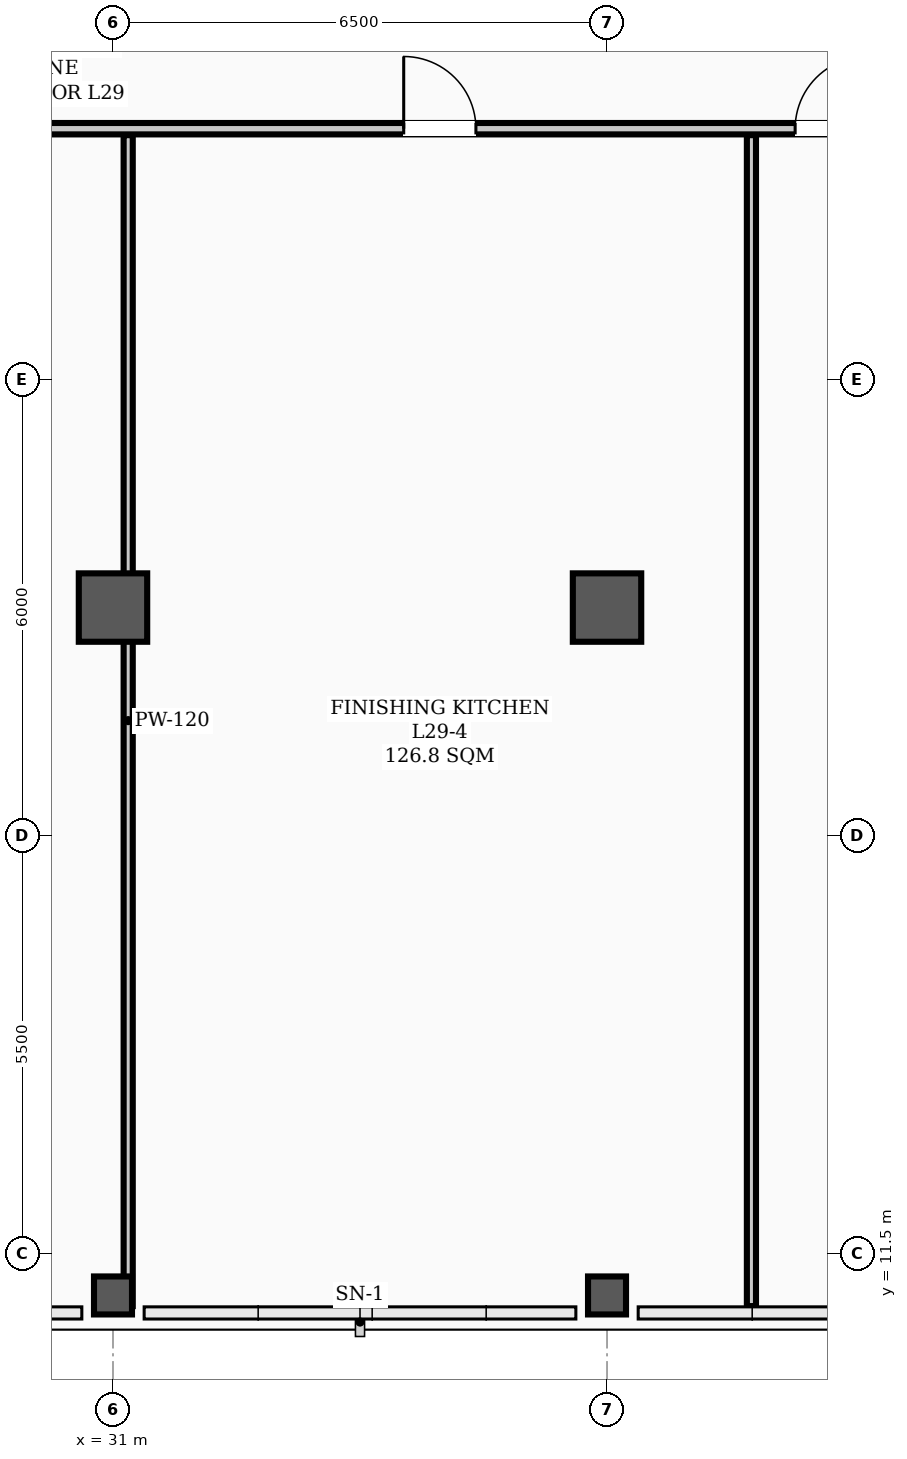
"""IFC4 building model, lengths in metres.
Left out: names, types, materials, properties, quantities, classifications, styles, units other than length and angle.
Written with IfcOpenShell. Run it as: python <this file> out.ifc"""

import sys

from ifc_helpers import new_model, si_unit, direction, frame, frame_2d, origin, origin_2d, place, context, subcontext, project, spatial, rectangle, hollow_rectangle, extrude, element, fill, save


model = new_model("IFC4")
c1 = context("Model", 3, precision=1e-05, world=origin(), true_north=direction((0.0, 1.0)))
c2 = subcontext(c1, "Body", "Model", "MODEL_VIEW")
j1 = project(units=[si_unit("LENGTHUNIT", "METRE"), si_unit("PLANEANGLEUNIT", "RADIAN")], contexts=[c1])
p1 = place(None, origin())
s1 = spatial("IfcSite", under=j1, at=p1, CompositionType="ELEMENT")
p2 = place(p1, origin())
s2 = spatial("IfcBuilding", under=s1, at=p2, CompositionType="ELEMENT")
p3 = place(p2, frame((0.0, 0.0, 118.8)))
s3 = spatial("IfcBuildingStorey", under=s2, at=p3, CompositionType="ELEMENT", Elevation=118.8)
for number, where, z_axis, x_axis in (
    (1, (31.0, 20.0, 0.0), (0.0, 0.0, 1.0), (1.0, 0.0, 0.0)),
    (2, (37.5, 20.0, 0.0), (0.0, 0.0, 1.0), (1.0, 0.0, 0.0)),
):
    element("IfcColumn", number, at=place(p3, frame(where, z_axis=z_axis, x_axis=x_axis)), inside=s3, PredefinedType="COLUMN", context=c2, shape_type="SweptSolid", body=[
        extrude(hollow_rectangle(XDim=0.9, YDim=0.9, WallThickness=0.035, InnerFilletRadius=0.017, OuterFilletRadius=0.052, at=origin_2d()), origin(), (0.0, 0.0, 1.0), 3.9),
    ])
for number, where, z_axis, x_axis in (
    (3, (31.0, 10.95, 0.0), (0.0, 0.0, 1.0), (1.0, 0.0, 0.0)),
    (4, (37.5, 10.95, 0.0), (0.0, 0.0, 1.0), (1.0, 0.0, 0.0)),
):
    element("IfcColumn", number, at=place(p3, frame(where, z_axis=z_axis, x_axis=x_axis)), inside=s3, PredefinedType="COLUMN", context=c2, shape_type="SweptSolid", body=[
        extrude(hollow_rectangle(XDim=0.5, YDim=0.5, WallThickness=0.024, InnerFilletRadius=0.012, OuterFilletRadius=0.036, at=origin_2d()), origin(), (0.0, 0.0, 1.0), 3.9),
    ])
p4 = place(p3, frame((2.31, 26.3, 0.0), z_axis=(0.0, 0.0, 1.0), x_axis=(1.0, 0.0, 0.0)))
e5 = element("IfcWall", 5, at=p4, inside=s3, PredefinedType="PARTITIONING", context=c2, shape_type="SweptSolid", body=[
    extrude(rectangle(XDim=46.38, YDim=0.15, at=frame_2d((23.19, 0.0))), origin(), (0.0, 0.0, 1.0), 3.1),
])
p5 = place(p4, frame((10.19, 0.0, 0.0)))
e6 = element("IfcOpeningElement", 6, at=p5, cuts=e5, PredefinedType="OPENING", context=c2, shape_type="SweptSolid", body=[
    extrude(rectangle(XDim=0.95, YDim=2.08, at=frame_2d((0.475, 1.04))), frame((0.0, 0.085, 0.0), z_axis=(0.0, -1.0, 0.0), x_axis=(1.0, 0.0, 0.0)), (0.0, 0.0, 1.0), 0.17),
])
p6 = place(p4, frame((15.915, 0.0, 0.0)))
e7 = element("IfcOpeningElement", 7, at=p6, cuts=e5, PredefinedType="OPENING", context=c2, shape_type="SweptSolid", body=[
    extrude(rectangle(XDim=0.95, YDim=2.08, at=frame_2d((0.475, 1.04))), frame((0.0, 0.085, 0.0), z_axis=(0.0, -1.0, 0.0), x_axis=(1.0, 0.0, 0.0)), (0.0, 0.0, 1.0), 0.17),
])
p7 = place(p4, frame((24.115, 0.0, 0.0)))
e8 = element("IfcOpeningElement", 8, at=p7, cuts=e5, PredefinedType="OPENING", context=c2, shape_type="SweptSolid", body=[
    extrude(rectangle(XDim=0.95, YDim=2.08, at=frame_2d((0.475, 1.04))), frame((0.0, 0.085, 0.0), z_axis=(0.0, -1.0, 0.0), x_axis=(1.0, 0.0, 0.0)), (0.0, 0.0, 1.0), 0.17),
])
p8 = place(p4, frame((32.515, 0.0, 0.0)))
e9 = element("IfcOpeningElement", 9, at=p8, cuts=e5, PredefinedType="OPENING", context=c2, shape_type="SweptSolid", body=[
    extrude(rectangle(XDim=0.95, YDim=2.08, at=frame_2d((0.475, 1.04))), frame((0.0, 0.085, 0.0), z_axis=(0.0, -1.0, 0.0), x_axis=(1.0, 0.0, 0.0)), (0.0, 0.0, 1.0), 0.17),
])
p9 = place(p4, frame((37.665, 0.0, 0.0)))
e10 = element("IfcOpeningElement", 10, at=p9, cuts=e5, PredefinedType="OPENING", context=c2, shape_type="SweptSolid", body=[
    extrude(rectangle(XDim=0.95, YDim=2.08, at=frame_2d((0.475, 1.04))), frame((0.0, 0.085, 0.0), z_axis=(0.0, -1.0, 0.0), x_axis=(1.0, 0.0, 0.0)), (0.0, 0.0, 1.0), 0.17),
])
for number, where, z_axis, x_axis in (
    (11, (31.2, 10.81, 0.0), (0.0, 0.0, 1.0), (0.0, 1.0, 0.0)),
    (12, (39.4, 10.81, 0.0), (0.0, 0.0, 1.0), (0.0, 1.0, 0.0)),
):
    element("IfcWall", number, at=place(p3, frame(where, z_axis=z_axis, x_axis=x_axis)), inside=s3, PredefinedType="PARTITIONING", context=c2, shape_type="SweptSolid", body=[
        extrude(rectangle(XDim=15.405, YDim=0.12, at=frame_2d((7.703, 0.0))), origin(), (0.0, 0.0, 1.0), 3.0),
    ])
p10 = place(p8, origin())
e13 = element("IfcDoor", 13, at=p10, inside=s3, OperationType="SINGLE_SWING_LEFT", PredefinedType="DOOR", context=c2, shape_type="SweptSolid", body=[
    extrude(rectangle(XDim=0.95, YDim=2.08, at=frame_2d((0.475, 1.04))), frame((0.0, 0.025, 0.0), z_axis=(0.0, -1.0, 0.0), x_axis=(1.0, 0.0, 0.0)), (0.0, 0.0, 1.0), 0.05),
])
fill(e9, e13)
p11 = place(p9, origin())
e14 = element("IfcDoor", 14, at=p11, inside=s3, OperationType="SINGLE_SWING_RIGHT", PredefinedType="DOOR", context=c2, shape_type="SweptSolid", body=[
    extrude(rectangle(XDim=0.95, YDim=2.08, at=frame_2d((0.475, 1.04))), frame((0.0, 0.025, 0.0), z_axis=(0.0, -1.0, 0.0), x_axis=(1.0, 0.0, 0.0)), (0.0, 0.0, 1.0), 0.05),
])
fill(e10, e14)
save(model, sys.argv[1])
